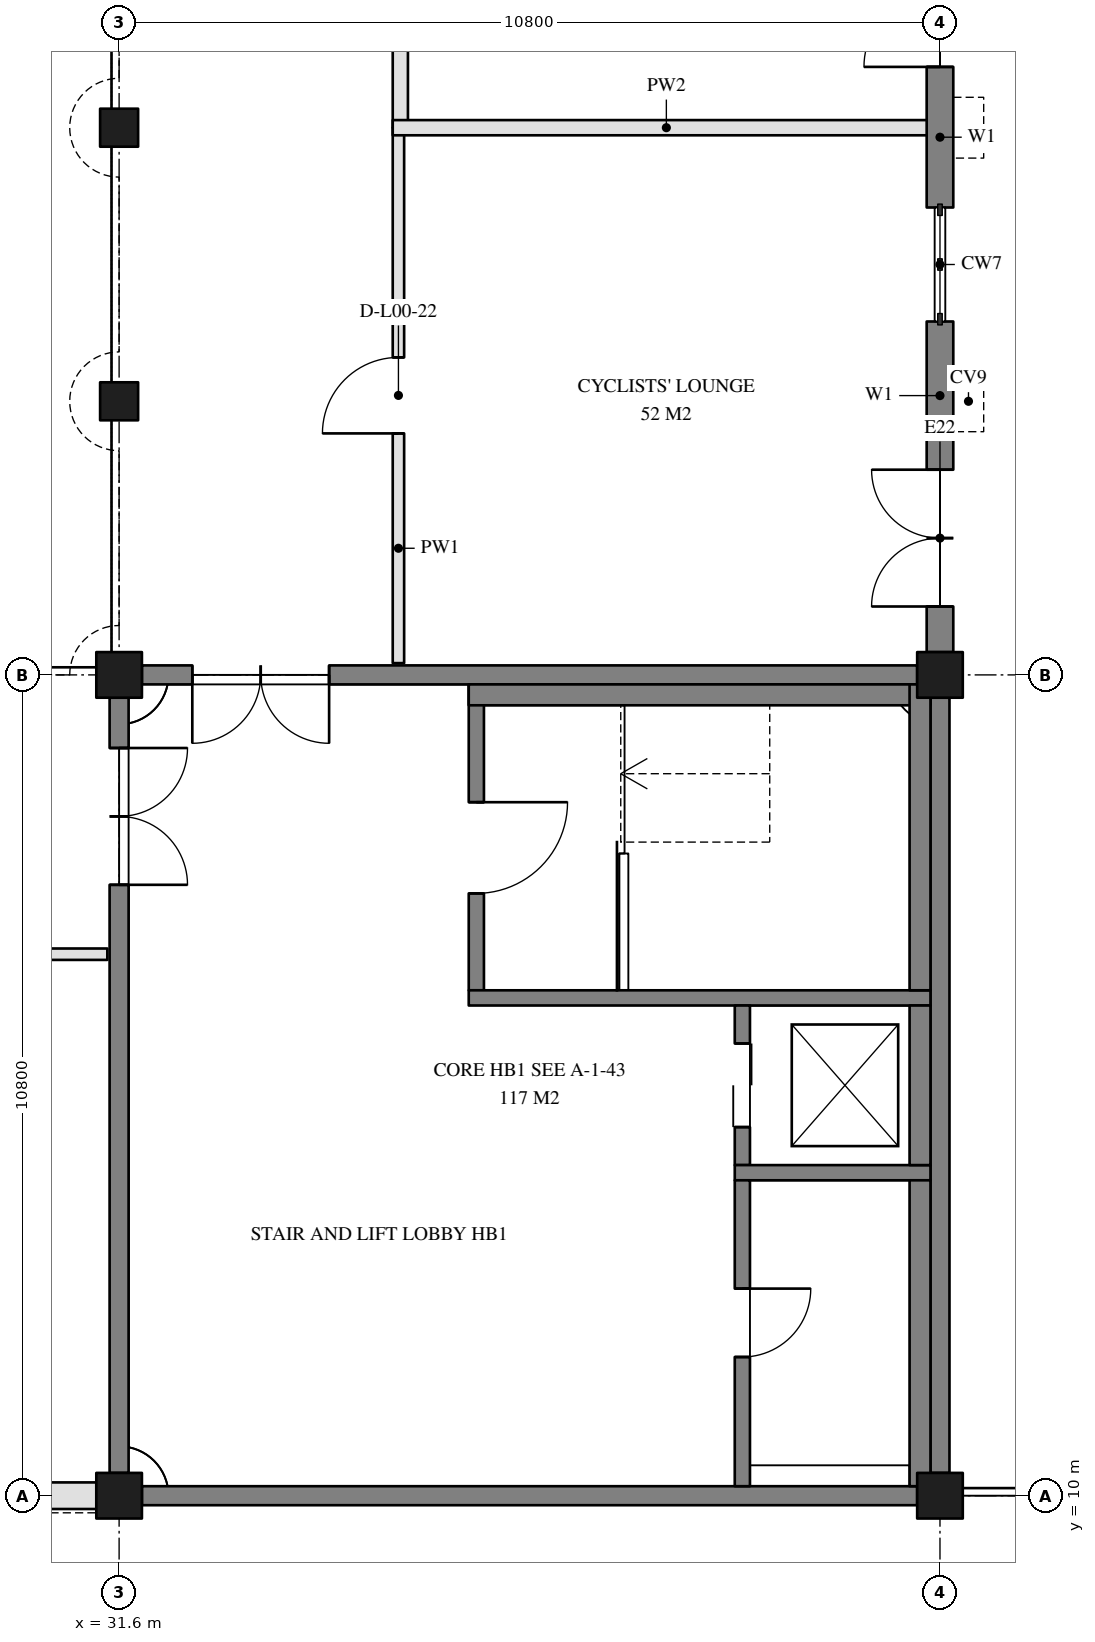
"""IFC4 building model, lengths in metres.
Left out: names, types, materials, properties, quantities, classifications, styles, units other than length and angle.
Written with IfcOpenShell. Run it as: python <this file> out.ifc"""

import sys

from ifc_helpers import new_model, si_unit, direction, frame, frame_2d, origin, origin_2d, place, context, subcontext, project, spatial, rectangle, extrude, element, fill, save


model = new_model("IFC4")
c1 = context("Model", 3, precision=1e-05, world=origin(), true_north=direction((0.0, 1.0)))
c2 = subcontext(c1, "Body", "Model", "MODEL_VIEW")
j1 = project(units=[si_unit("LENGTHUNIT", "METRE"), si_unit("PLANEANGLEUNIT", "RADIAN")], contexts=[c1])
p1 = place(None, origin())
s1 = spatial("IfcSite", under=j1, at=p1, CompositionType="ELEMENT")
p2 = place(p1, origin())
s2 = spatial("IfcBuilding", under=s1, at=p2, CompositionType="ELEMENT")
p3 = place(p2, origin())
s3 = spatial("IfcBuildingStorey", under=s2, at=p3, CompositionType="ELEMENT", Elevation=0.0)
p4 = place(p3, frame((31.6, 10.0, 0.0), z_axis=(0.0, 0.0, 1.0), x_axis=(1.0, 0.0, 0.0)))
e1 = element("IfcColumn", 1, at=p4, inside=s3, PredefinedType="COLUMN", context=c2, shape_type="SweptSolid", body=[
    extrude(rectangle(XDim=0.6, YDim=0.6, at=origin_2d()), origin(), (0.0, 0.0, 1.0), 3.85),
])
p5 = place(p3, frame((31.6, 20.8, 0.0), z_axis=(0.0, 0.0, 1.0), x_axis=(1.0, 0.0, 0.0)))
e2 = element("IfcColumn", 2, at=p5, inside=s3, PredefinedType="COLUMN", context=c2, shape_type="SweptSolid", body=[
    extrude(rectangle(XDim=0.6, YDim=0.6, at=origin_2d()), origin(), (0.0, 0.0, 1.0), 4.8),
])
for number, where, z_axis, x_axis in (
    (3, (42.4, 10.0, 0.0), (0.0, 0.0, 1.0), (1.0, 0.0, 0.0)),
    (4, (42.4, 20.8, 0.0), (0.0, 0.0, 1.0), (1.0, 0.0, 0.0)),
):
    element("IfcColumn", number, at=place(p3, frame(where, z_axis=z_axis, x_axis=x_axis)), inside=s3, PredefinedType="COLUMN", context=c2, shape_type="SweptSolid", body=[
        extrude(rectangle(XDim=0.6, YDim=0.6, at=origin_2d()), origin(), (0.0, 0.0, 1.0), 3.85),
    ])
for number, where, z_axis, x_axis in (
    (5, (31.6, 24.4, 0.0), (0.0, 0.0, 1.0), (1.0, 0.0, 0.0)),
    (6, (31.6, 28.0, 0.0), (0.0, 0.0, 1.0), (1.0, 0.0, 0.0)),
):
    element("IfcColumn", number, at=place(p3, frame(where, z_axis=z_axis, x_axis=x_axis)), inside=s3, PredefinedType="COLUMN", context=c2, shape_type="SweptSolid", body=[
        extrude(rectangle(XDim=0.5, YDim=0.5, at=origin_2d()), origin(), (0.0, 0.0, 1.0), 4.8),
    ])
p6 = place(p3, frame((31.9, 10.0, 0.0), z_axis=(0.0, 0.0, 1.0), x_axis=(1.0, 0.0, 0.0)))
e7 = element("IfcWall", 7, at=p6, inside=s3, PredefinedType="SOLIDWALL", context=c2, shape_type="SweptSolid", body=[
    extrude(rectangle(XDim=10.2, YDim=0.25, at=frame_2d((5.1, 0.0))), origin(), (0.0, 0.0, 1.0), 4.8),
])
p7 = place(p3, frame((42.4, 10.3, 0.0), z_axis=(0.0, 0.0, 1.0), x_axis=(0.0, 1.0, 0.0)))
e8 = element("IfcWall", 8, at=p7, inside=s3, PredefinedType="SOLIDWALL", context=c2, shape_type="SweptSolid", body=[
    extrude(rectangle(XDim=10.2, YDim=0.25, at=frame_2d((5.1, 0.0))), origin(), (0.0, 0.0, 1.0), 4.8),
])
p8 = place(p3, frame((42.1, 20.8, 0.0), z_axis=(0.0, 0.0, 1.0), x_axis=(-1.0, 0.0, 0.0)))
e9 = element("IfcWall", 9, at=p8, inside=s3, PredefinedType="SOLIDWALL", context=c2, shape_type="SweptSolid", body=[
    extrude(rectangle(XDim=10.2, YDim=0.25, at=frame_2d((5.1, 0.0))), origin(), (0.0, 0.0, 1.0), 4.8),
])
p9 = place(p8, frame((7.737, 0.0, 0.0)))
e10 = element("IfcOpeningElement", 10, at=p9, cuts=e9, PredefinedType="OPENING", context=c2, shape_type="SweptSolid", body=[
    extrude(rectangle(XDim=1.8, YDim=2.1, at=frame_2d((0.9, 1.05))), frame((0.0, 0.135, 0.0), z_axis=(0.0, -1.0, 0.0), x_axis=(1.0, 0.0, 0.0)), (0.0, 0.0, 1.0), 0.27),
])
p10 = place(p3, frame((31.6, 20.5, 0.0), z_axis=(0.0, 0.0, 1.0), x_axis=(0.0, -1.0, 0.0)))
e11 = element("IfcWall", 11, at=p10, inside=s3, PredefinedType="SOLIDWALL", context=c2, shape_type="SweptSolid", body=[
    extrude(rectangle(XDim=10.2, YDim=0.25, at=frame_2d((5.1, 0.0))), origin(), (0.0, 0.0, 1.0), 4.8),
])
p11 = place(p10, frame((0.662, 0.0, 0.0)))
e12 = element("IfcOpeningElement", 12, at=p11, cuts=e11, PredefinedType="OPENING", context=c2, shape_type="SweptSolid", body=[
    extrude(rectangle(XDim=1.8, YDim=2.1, at=frame_2d((0.9, 1.05))), frame((0.0, 0.135, 0.0), z_axis=(0.0, -1.0, 0.0), x_axis=(1.0, 0.0, 0.0)), (0.0, 0.0, 1.0), 0.27),
])
p12 = place(p3, frame((21.1, 10.0, 0.0), z_axis=(0.0, 0.0, 1.0), x_axis=(1.0, 0.0, 0.0)))
e13 = element("IfcWall", 13, at=p12, inside=s3, PredefinedType="SOLIDWALL", context=c2, shape_type="SweptSolid", body=[
    extrude(rectangle(XDim=10.2, YDim=0.35, at=frame_2d((5.1, 0.0))), origin(), (0.0, 0.0, 1.0), 3.85),
])
p13 = place(p12, frame((0.75, 0.0, 0.9)))
e14 = element("IfcOpeningElement", 14, at=p13, cuts=e13, PredefinedType="OPENING", context=c2, shape_type="SweptSolid", body=[
    extrude(rectangle(XDim=1.5, YDim=2.4, at=frame_2d((0.75, 1.2))), frame((0.0, 0.185, 0.0), z_axis=(0.0, -1.0, 0.0), x_axis=(1.0, 0.0, 0.0)), (0.0, 0.0, 1.0), 0.37),
])
p14 = place(p12, frame((4.35, 0.0, 0.9)))
e15 = element("IfcOpeningElement", 15, at=p14, cuts=e13, PredefinedType="OPENING", context=c2, shape_type="SweptSolid", body=[
    extrude(rectangle(XDim=1.5, YDim=2.4, at=frame_2d((0.75, 1.2))), frame((0.0, 0.185, 0.0), z_axis=(0.0, -1.0, 0.0), x_axis=(1.0, 0.0, 0.0)), (0.0, 0.0, 1.0), 0.37),
])
p15 = place(p12, frame((7.95, 0.0, 0.9)))
e16 = element("IfcOpeningElement", 16, at=p15, cuts=e13, PredefinedType="OPENING", context=c2, shape_type="SweptSolid", body=[
    extrude(rectangle(XDim=1.5, YDim=2.4, at=frame_2d((0.75, 1.2))), frame((0.0, 0.185, 0.0), z_axis=(0.0, -1.0, 0.0), x_axis=(1.0, 0.0, 0.0)), (0.0, 0.0, 1.0), 0.37),
])
p16 = place(p3, frame((42.4, 21.1, 0.0), z_axis=(0.0, 0.0, 1.0), x_axis=(0.0, 1.0, 0.0)))
e17 = element("IfcWall", 17, at=p16, inside=s3, PredefinedType="SOLIDWALL", context=c2, shape_type="SweptSolid", body=[
    extrude(rectangle(XDim=4.35, YDim=0.35, at=frame_2d((2.175, 0.0))), origin(), (0.0, 0.0, 1.0), 3.85),
])
p17 = place(p16, frame((0.6, 0.0, 0.0)))
e18 = element("IfcOpeningElement", 18, at=p17, cuts=e17, PredefinedType="OPENING", context=c2, shape_type="SweptSolid", body=[
    extrude(rectangle(XDim=1.8, YDim=2.4, at=frame_2d((0.9, 1.2))), frame((0.0, 0.185, 0.0), z_axis=(0.0, -1.0, 0.0), x_axis=(1.0, 0.0, 0.0)), (0.0, 0.0, 1.0), 0.37),
])
p18 = place(p3, frame((42.4, 26.95, 0.0), z_axis=(0.0, 0.0, 1.0), x_axis=(0.0, 1.0, 0.0)))
e19 = element("IfcWall", 19, at=p18, inside=s3, PredefinedType="SOLIDWALL", context=c2, shape_type="SweptSolid", body=[
    extrude(rectangle(XDim=4.35, YDim=0.35, at=frame_2d((2.175, 0.0))), origin(), (0.0, 0.0, 1.0), 3.85),
])
p19 = place(p18, frame((1.85, 0.0, 0.0)))
e20 = element("IfcOpeningElement", 20, at=p19, cuts=e19, PredefinedType="OPENING", context=c2, shape_type="SweptSolid", body=[
    extrude(rectangle(XDim=2.0, YDim=2.4, at=frame_2d((1.0, 1.2))), frame((0.0, 0.185, 0.0), z_axis=(0.0, -1.0, 0.0), x_axis=(1.0, 0.0, 0.0)), (0.0, 0.0, 1.0), 0.37),
])
p20 = place(p3, frame((36.3, 20.675, 0.0), z_axis=(0.0, 0.0, 1.0), x_axis=(0.0, -1.0, 0.0)))
e21 = element("IfcWall", 21, at=p20, inside=s3, PredefinedType="SOLIDWALL", context=c2, shape_type="SweptSolid", body=[
    extrude(rectangle(XDim=4.025, YDim=0.2, at=frame_2d((2.013, 0.0))), origin(), (0.0, 0.0, 1.0), 4.19),
])
p21 = place(p20, frame((1.55, 0.0, 0.0)))
e22 = element("IfcOpeningElement", 22, at=p21, cuts=e21, PredefinedType="OPENING", context=c2, shape_type="SweptSolid", body=[
    extrude(rectangle(XDim=1.2, YDim=2.1, at=frame_2d((0.6, 1.05))), frame((0.0, 0.11, 0.0), z_axis=(0.0, -1.0, 0.0), x_axis=(1.0, 0.0, 0.0)), (0.0, 0.0, 1.0), 0.22),
])
p22 = place(p3, frame((36.2, 16.55, 0.0), z_axis=(0.0, 0.0, 1.0), x_axis=(1.0, 0.0, 0.0)))
e23 = element("IfcWall", 23, at=p22, inside=s3, PredefinedType="SOLIDWALL", context=c2, shape_type="SweptSolid", body=[
    extrude(rectangle(XDim=6.075, YDim=0.2, at=frame_2d((3.038, 0.0))), origin(), (0.0, 0.0, 1.0), 3.85),
])
p23 = place(p3, frame((39.8, 16.45, 0.0), z_axis=(0.0, 0.0, 1.0), x_axis=(0.0, -1.0, 0.0)))
e24 = element("IfcWall", 24, at=p23, inside=s3, PredefinedType="SOLIDWALL", context=c2, shape_type="SweptSolid", body=[
    extrude(rectangle(XDim=2.1, YDim=0.2, at=frame_2d((1.05, 0.0))), origin(), (0.0, 0.0, 1.0), 4.4),
])
p24 = place(p23, frame((0.5, 0.0, 0.0)))
e25 = element("IfcOpeningElement", 25, at=p24, cuts=e24, PredefinedType="OPENING", context=c2, shape_type="SweptSolid", body=[
    extrude(rectangle(XDim=1.1, YDim=2.1, at=frame_2d((0.55, 1.05))), frame((0.0, 0.11, 0.0), z_axis=(0.0, -1.0, 0.0), x_axis=(1.0, 0.0, 0.0)), (0.0, 0.0, 1.0), 0.22),
])
p25 = place(p3, frame((39.7, 14.25, 0.0), z_axis=(0.0, 0.0, 1.0), x_axis=(1.0, 0.0, 0.0)))
e26 = element("IfcWall", 26, at=p25, inside=s3, PredefinedType="SOLIDWALL", context=c2, shape_type="SweptSolid", body=[
    extrude(rectangle(XDim=2.575, YDim=0.2, at=frame_2d((1.288, 0.0))), origin(), (0.0, 0.0, 1.0), 3.85),
])
p26 = place(p3, frame((39.8, 14.15, 0.0), z_axis=(0.0, 0.0, 1.0), x_axis=(0.0, -1.0, 0.0)))
e27 = element("IfcWall", 27, at=p26, inside=s3, PredefinedType="SOLIDWALL", context=c2, shape_type="SweptSolid", body=[
    extrude(rectangle(XDim=4.025, YDim=0.2, at=frame_2d((2.012, 0.0))), origin(), (0.0, 0.0, 1.0), 3.85),
])
p27 = place(p26, frame((1.425, 0.0, 0.0)))
e28 = element("IfcOpeningElement", 28, at=p27, cuts=e27, PredefinedType="OPENING", context=c2, shape_type="SweptSolid", body=[
    extrude(rectangle(XDim=0.9, YDim=2.1, at=frame_2d((0.45, 1.05))), frame((0.0, 0.11, 0.0), z_axis=(0.0, -1.0, 0.0), x_axis=(1.0, 0.0, 0.0)), (0.0, 0.0, 1.0), 0.22),
])
p28 = place(p3, frame((36.2, 20.538, -0.6), z_axis=(0.0, 0.0, 1.0), x_axis=(1.0, 0.0, 0.0)))
e29 = element("IfcWall", 29, at=p28, inside=s3, PredefinedType="SOLIDWALL", context=c2, shape_type="SweptSolid", body=[
    extrude(rectangle(XDim=6.075, YDim=0.275, at=frame_2d((3.038, 0.0))), origin(), (0.0, 0.0, 1.0), 4.45),
])
p29 = place(p3, frame((42.137, 20.675, -0.6), z_axis=(0.0, 0.0, 1.0), x_axis=(0.0, -1.0, 0.0)))
e30 = element("IfcWall", 30, at=p29, inside=s3, PredefinedType="SOLIDWALL", context=c2, shape_type="SweptSolid", body=[
    extrude(rectangle(XDim=4.025, YDim=0.275, at=frame_2d((2.013, 0.0))), origin(), (0.0, 0.0, 1.0), 4.45),
])
p30 = place(p3, frame((42.137, 16.45, -0.6), z_axis=(0.0, 0.0, 1.0), x_axis=(0.0, -1.0, 0.0)))
e31 = element("IfcWall", 31, at=p30, inside=s3, PredefinedType="SOLIDWALL", context=c2, shape_type="SweptSolid", body=[
    extrude(rectangle(XDim=2.1, YDim=0.275, at=frame_2d((1.05, 0.0))), origin(), (0.0, 0.0, 1.0), 4.45),
])
p31 = place(p3, frame((42.137, 14.15, -0.6), z_axis=(0.0, 0.0, 1.0), x_axis=(0.0, -1.0, 0.0)))
e32 = element("IfcWall", 32, at=p31, inside=s3, PredefinedType="SOLIDWALL", context=c2, shape_type="SweptSolid", body=[
    extrude(rectangle(XDim=4.025, YDim=0.275, at=frame_2d((2.012, 0.0))), origin(), (0.0, 0.0, 1.0), 4.45),
])
p32 = place(p3, frame((17.2, 17.125, 0.0), z_axis=(0.0, 0.0, 1.0), x_axis=(1.0, 0.0, 0.0)))
e33 = element("IfcWall", 33, at=p32, inside=s3, PredefinedType="PARTITIONING", context=c2, shape_type="SweptSolid", body=[
    extrude(rectangle(XDim=14.245, YDim=0.15, at=frame_2d((7.123, 0.0))), origin(), (0.0, 0.0, 1.0), 3.94),
])
p33 = place(p32, frame((6.222, 0.0, 0.0)))
e34 = element("IfcOpeningElement", 34, at=p33, cuts=e33, PredefinedType="OPENING", context=c2, shape_type="SweptSolid", body=[
    extrude(rectangle(XDim=1.8, YDim=2.1, at=frame_2d((0.9, 1.05))), frame((0.0, 0.085, 0.0), z_axis=(0.0, -1.0, 0.0), x_axis=(1.0, 0.0, 0.0)), (0.0, 0.0, 1.0), 0.17),
])
p34 = place(p3, frame((35.275, 20.955, 0.0), z_axis=(0.0, 0.0, 1.0), x_axis=(0.0, 1.0, 0.0)))
e35 = element("IfcWall", 35, at=p34, inside=s3, PredefinedType="PARTITIONING", context=c2, shape_type="SweptSolid", body=[
    extrude(rectangle(XDim=7.045, YDim=0.15, at=frame_2d((3.522, 0.0))), origin(), (0.0, 0.0, 1.0), 4.19),
])
p35 = place(p34, frame((3.022, 0.0, 0.0)))
e36 = element("IfcOpeningElement", 36, at=p35, cuts=e35, PredefinedType="OPENING", context=c2, shape_type="SweptSolid", body=[
    extrude(rectangle(XDim=1.0, YDim=2.1, at=frame_2d((0.5, 1.05))), frame((0.0, 0.085, 0.0), z_axis=(0.0, -1.0, 0.0), x_axis=(1.0, 0.0, 0.0)), (0.0, 0.0, 1.0), 0.17),
])
p36 = place(p3, frame((35.3, 28.0, 0.0), z_axis=(0.0, 0.0, 1.0), x_axis=(0.0, 1.0, 0.0)))
e37 = element("IfcWall", 37, at=p36, inside=s3, PredefinedType="PARTITIONING", context=c2, shape_type="SweptSolid", body=[
    extrude(rectangle(XDim=7.2, YDim=0.2, at=frame_2d((3.6, 0.0))), origin(), (0.0, 0.0, 1.0), 3.94),
])
p37 = place(p36, frame((2.7, 0.0, 0.0)))
e38 = element("IfcOpeningElement", 38, at=p37, cuts=e37, PredefinedType="OPENING", context=c2, shape_type="SweptSolid", body=[
    extrude(rectangle(XDim=1.8, YDim=2.1, at=frame_2d((0.9, 1.05))), frame((0.0, 0.11, 0.0), z_axis=(0.0, -1.0, 0.0), x_axis=(1.0, 0.0, 0.0)), (0.0, 0.0, 1.0), 0.22),
])
p38 = place(p3, frame((35.2, 28.0, 0.0), z_axis=(0.0, 0.0, 1.0), x_axis=(1.0, 0.0, 0.0)))
e39 = element("IfcWall", 39, at=p38, inside=s3, PredefinedType="PARTITIONING", context=c2, shape_type="SweptSolid", body=[
    extrude(rectangle(XDim=7.2, YDim=0.2, at=frame_2d((3.6, 0.0))), origin(), (0.0, 0.0, 1.0), 3.85),
])
p39 = place(p17, origin())
e40 = element("IfcDoor", 40, at=p39, inside=s3, OperationType="DOUBLE_DOOR_DOUBLE_SWING", PredefinedType="DOOR", context=c2, shape_type="SweptSolid", body=[
    extrude(rectangle(XDim=1.8, YDim=2.4, at=frame_2d((0.9, 1.2))), frame((0.0, 0.025, 0.0), z_axis=(0.0, -1.0, 0.0), x_axis=(1.0, 0.0, 0.0)), (0.0, 0.0, 1.0), 0.05),
])
fill(e18, e40)
p40 = place(p19, origin())
e41 = element("IfcDoor", 41, at=p40, inside=s3, OperationType="DOUBLE_DOOR_SINGLE_SWING", PredefinedType="DOOR", context=c2, shape_type="SweptSolid", body=[
    extrude(rectangle(XDim=2.0, YDim=2.4, at=frame_2d((1.0, 1.2))), frame((0.0, 0.025, 0.0), z_axis=(0.0, -1.0, 0.0), x_axis=(1.0, 0.0, 0.0)), (0.0, 0.0, 1.0), 0.05),
])
fill(e20, e41)
p41 = place(p24, frame((1.1, 0.0, 0.0), z_axis=(0.0, 0.0, 1.0), x_axis=(-1.0, 0.0, 0.0)))
e42 = element("IfcDoor", 42, at=p41, inside=s3, OperationType="DOUBLE_DOOR_SLIDING", PredefinedType="DOOR", context=c2, shape_type="SweptSolid", body=[
    extrude(rectangle(XDim=1.1, YDim=2.1, at=frame_2d((0.55, 1.05))), frame((0.0, 0.025, 0.0), z_axis=(0.0, -1.0, 0.0), x_axis=(1.0, 0.0, 0.0)), (0.0, 0.0, 1.0), 0.05),
])
fill(e25, e42)
p42 = place(p21, frame((1.2, 0.0, 0.0), z_axis=(0.0, 0.0, 1.0), x_axis=(-1.0, 0.0, 0.0)))
e43 = element("IfcDoor", 43, at=p42, inside=s3, OperationType="SINGLE_SWING_LEFT", PredefinedType="DOOR", context=c2, shape_type="SweptSolid", body=[
    extrude(rectangle(XDim=1.2, YDim=2.1, at=frame_2d((0.6, 1.05))), frame((0.0, 0.025, 0.0), z_axis=(0.0, -1.0, 0.0), x_axis=(1.0, 0.0, 0.0)), (0.0, 0.0, 1.0), 0.05),
])
fill(e22, e43)
p43 = place(p27, frame((0.9, 0.0, 0.0), z_axis=(0.0, 0.0, 1.0), x_axis=(-1.0, 0.0, 0.0)))
e44 = element("IfcDoor", 44, at=p43, inside=s3, OperationType="SINGLE_SWING_RIGHT", PredefinedType="DOOR", context=c2, shape_type="SweptSolid", body=[
    extrude(rectangle(XDim=0.9, YDim=2.1, at=frame_2d((0.45, 1.05))), frame((0.0, 0.025, 0.0), z_axis=(0.0, -1.0, 0.0), x_axis=(1.0, 0.0, 0.0)), (0.0, 0.0, 1.0), 0.05),
])
fill(e28, e44)
p44 = place(p11, frame((1.8, 0.0, 0.0), z_axis=(0.0, 0.0, 1.0), x_axis=(-1.0, 0.0, 0.0)))
e45 = element("IfcDoor", 45, at=p44, inside=s3, OperationType="DOUBLE_DOOR_DOUBLE_SWING", PredefinedType="DOOR", context=c2, shape_type="SweptSolid", body=[
    extrude(rectangle(XDim=1.8, YDim=2.1, at=frame_2d((0.9, 1.05))), frame((0.0, 0.025, 0.0), z_axis=(0.0, -1.0, 0.0), x_axis=(1.0, 0.0, 0.0)), (0.0, 0.0, 1.0), 0.05),
])
fill(e12, e45)
p45 = place(p9, frame((1.8, 0.0, 0.0), z_axis=(0.0, 0.0, 1.0), x_axis=(-1.0, 0.0, 0.0)))
e46 = element("IfcDoor", 46, at=p45, inside=s3, OperationType="DOUBLE_DOOR_DOUBLE_SWING", PredefinedType="DOOR", context=c2, shape_type="SweptSolid", body=[
    extrude(rectangle(XDim=1.8, YDim=2.1, at=frame_2d((0.9, 1.05))), frame((0.0, 0.025, 0.0), z_axis=(0.0, -1.0, 0.0), x_axis=(1.0, 0.0, 0.0)), (0.0, 0.0, 1.0), 0.05),
])
fill(e10, e46)
p46 = place(p35, origin())
e47 = element("IfcDoor", 47, at=p46, inside=s3, OperationType="SINGLE_SWING_LEFT", PredefinedType="DOOR", context=c2, shape_type="SweptSolid", body=[
    extrude(rectangle(XDim=1.0, YDim=2.1, at=frame_2d((0.5, 1.05))), frame((0.0, 0.025, 0.0), z_axis=(0.0, -1.0, 0.0), x_axis=(1.0, 0.0, 0.0)), (0.0, 0.0, 1.0), 0.05),
])
fill(e36, e47)
save(model, sys.argv[1])
